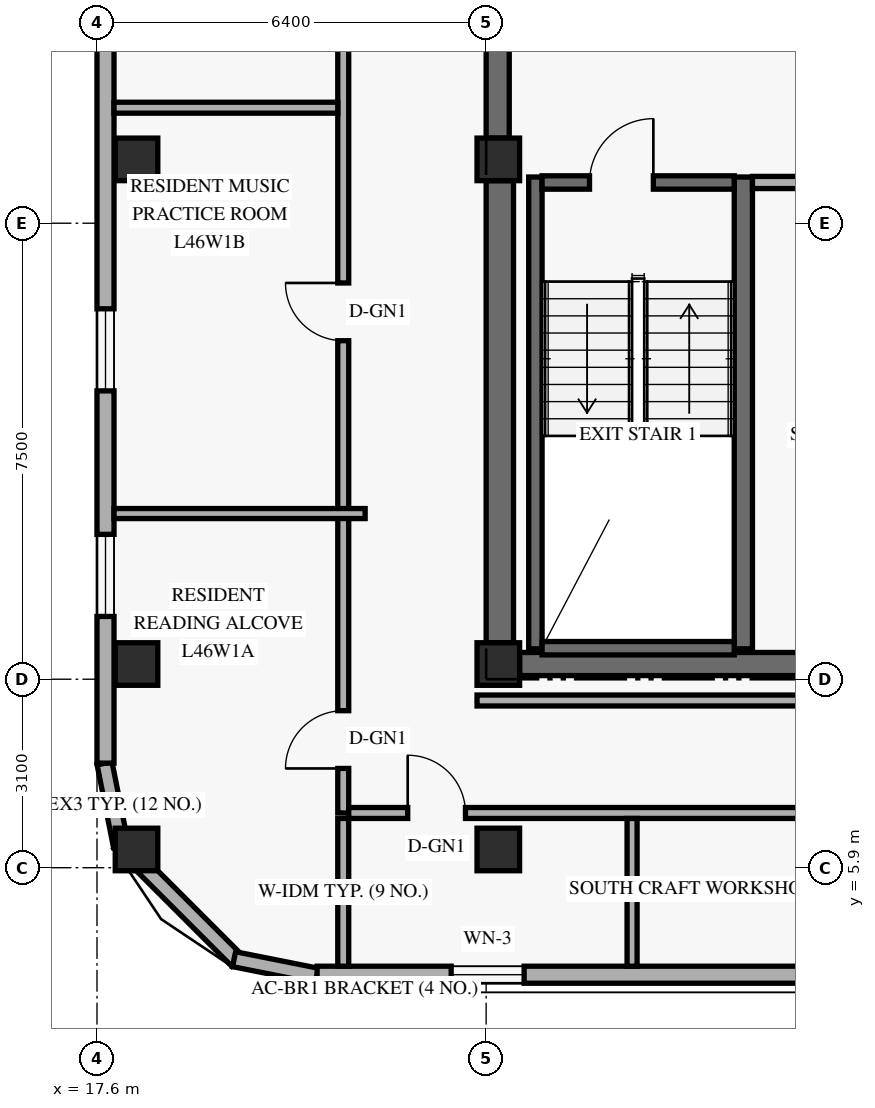
"""IFC4 building model, lengths in metres.
Left out: names, types, materials, properties, quantities, classifications, styles, units other than length and angle.
Written with IfcOpenShell. Run it as: python <this file> out.ifc"""

import sys

from ifc_helpers import new_model, si_unit, direction, frame, frame_2d, origin, origin_2d, place, context, subcontext, project, spatial, rectangle, extrude, element, fill, save


model = new_model("IFC4")
c1 = context("Model", 3, precision=1e-05, world=origin(), true_north=direction((0.0, 1.0)))
c2 = subcontext(c1, "Body", "Model", "MODEL_VIEW")
j1 = project(units=[si_unit("LENGTHUNIT", "METRE"), si_unit("PLANEANGLEUNIT", "RADIAN")], contexts=[c1])
p1 = place(None, origin())
s1 = spatial("IfcSite", under=j1, at=p1, CompositionType="ELEMENT")
p2 = place(p1, origin())
s2 = spatial("IfcBuilding", under=s1, at=p2, CompositionType="ELEMENT")
p3 = place(p2, frame((0.0, 0.0, 177.6)))
s3 = spatial("IfcBuildingStorey", under=s2, at=p3, CompositionType="ELEMENT", Elevation=177.6)
p4 = place(p3, frame((24.225, 9.6, 0.0), z_axis=(0.0, 0.0, 1.0), x_axis=(0.0, 1.0, 0.0)))
e1 = element("IfcWall", 1, at=p4, inside=s3, PredefinedType="SHEAR", context=c2, shape_type="SweptSolid", body=[
    extrude(rectangle(XDim=7.6, YDim=0.45, at=frame_2d((3.8, 0.0))), origin(), (0.0, 0.0, 1.0), 2.748),
])
p5 = place(p3, frame((24.19, 17.9, 0.0), z_axis=(0.0, 0.0, 1.0), x_axis=(0.0, 1.0, 0.0)))
e2 = element("IfcWall", 2, at=p5, inside=s3, PredefinedType="SHEAR", context=c2, shape_type="SweptSolid", body=[
    extrude(rectangle(XDim=11.95, YDim=0.38, at=frame_2d((5.975, 0.0))), origin(), (0.0, 0.0, 1.0), 2.748),
])
p6 = place(p3, frame((24.55, 9.25, 0.0), z_axis=(0.0, 0.0, 1.0), x_axis=(1.0, 0.0, 0.0)))
e3 = element("IfcWall", 3, at=p6, inside=s3, PredefinedType="SHEAR", context=c2, shape_type="SweptSolid", body=[
    extrude(rectangle(XDim=10.3, YDim=0.38, at=frame_2d((5.15, 0.0))), origin(), (0.0, 0.0, 1.0), 3.36),
])
p7 = place(p6, frame((5.2, 0.0, 0.0)))
e4 = element("IfcOpeningElement", 4, at=p7, cuts=e3, PredefinedType="OPENING", context=c2, shape_type="SweptSolid", body=[
    extrude(rectangle(XDim=1.05, YDim=2.15, at=frame_2d((0.525, 1.075))), frame((0.0, 0.2, 0.0), z_axis=(0.0, -1.0, 0.0), x_axis=(1.0, 0.0, 0.0)), (0.0, 0.0, 1.0), 0.4),
])
p8 = place(p3, frame((24.81, 9.5, 0.0), z_axis=(0.0, 0.0, 1.0), x_axis=(0.0, 1.0, 0.0)))
e5 = element("IfcWall", 5, at=p8, inside=s3, PredefinedType="SHEAR", context=c2, shape_type="SweptSolid", body=[
    extrude(rectangle(XDim=7.76, YDim=0.22, at=frame_2d((3.88, 0.0))), origin(), (0.0, 0.0, 1.0), 3.36),
])
p9 = place(p3, frame((28.23, 9.5, 0.0), z_axis=(0.0, 0.0, 1.0), x_axis=(0.0, 1.0, 0.0)))
e6 = element("IfcWall", 6, at=p9, inside=s3, PredefinedType="SHEAR", context=c2, shape_type="SweptSolid", body=[
    extrude(rectangle(XDim=7.76, YDim=0.3, at=frame_2d((3.88, 0.0))), origin(), (0.0, 0.0, 1.0), 3.36),
])
p10 = place(p3, frame((24.92, 9.51, 0.0), z_axis=(0.0, 0.0, 1.0), x_axis=(1.0, 0.0, 0.0)))
e7 = element("IfcWall", 7, at=p10, inside=s3, PredefinedType="SHEAR", context=c2, shape_type="SweptSolid", body=[
    extrude(rectangle(XDim=3.16, YDim=0.22, at=frame_2d((1.58, 0.0))), origin(), (0.0, 0.0, 1.0), 3.36),
])
p11 = place(p3, frame((24.92, 17.17, 0.0), z_axis=(0.0, 0.0, 1.0), x_axis=(1.0, 0.0, 0.0)))
e8 = element("IfcWall", 8, at=p11, inside=s3, PredefinedType="SHEAR", context=c2, shape_type="SweptSolid", body=[
    extrude(rectangle(XDim=3.16, YDim=0.22, at=frame_2d((1.58, 0.0))), origin(), (0.0, 0.0, 1.0), 3.36),
])
p12 = place(p11, frame((0.78, 0.0, 0.0)))
e9 = element("IfcOpeningElement", 9, at=p12, cuts=e8, PredefinedType="OPENING", context=c2, shape_type="SweptSolid", body=[
    extrude(rectangle(XDim=1.05, YDim=2.15, at=frame_2d((0.525, 1.075))), frame((0.0, 0.12, 0.0), z_axis=(0.0, -1.0, 0.0), x_axis=(1.0, 0.0, 0.0)), (0.0, 0.0, 1.0), 0.24),
])
for number, where, z_axis, x_axis in (
    (10, (18.25, 6.2, 0.0), (0.0, 0.0, 1.0), (1.0, 0.0, 0.0)),
    (11, (18.25, 9.25, 0.0), (0.0, 0.0, 1.0), (1.0, 0.0, 0.0)),
    (12, (18.25, 17.55, 0.0), (0.0, 0.0, 1.0), (1.0, 0.0, 0.0)),
    (13, (24.2, 6.2, 0.0), (0.0, 0.0, 1.0), (1.0, 0.0, 0.0)),
    (14, (24.2, 9.25, 0.0), (0.0, 0.0, 1.0), (1.0, 0.0, 0.0)),
    (15, (24.2, 17.55, 0.0), (0.0, 0.0, 1.0), (1.0, 0.0, 0.0)),
):
    element("IfcColumn", number, at=place(p3, frame(where, z_axis=z_axis, x_axis=x_axis)), inside=s3, PredefinedType="COLUMN", context=c2, shape_type="SweptSolid", body=[
        extrude(rectangle(XDim=0.7, YDim=0.7, at=origin_2d()), origin(), (0.0, 0.0, 1.0), 3.6),
    ])
p13 = place(p3, frame((17.724, 7.616, 0.0), z_axis=(0.0, 0.0, 1.0), x_axis=(0.195135625965, -0.9807762678, 0.0)))
e16 = element("IfcWall", 16, at=p13, inside=s3, PredefinedType="SOLIDWALL", context=c2, shape_type="SweptSolid", body=[
    extrude(rectangle(XDim=1.389, YDim=0.25, at=frame_2d((0.694, 0.0))), origin(), (0.0, 0.0, 1.0), 3.36),
])
p14 = place(p3, frame((17.968, 6.305, 0.0), z_axis=(0.0, 0.0, 1.0), x_axis=(0.707106781187, -0.707106781187, 0.0)))
e17 = element("IfcWall", 17, at=p14, inside=s3, PredefinedType="SOLIDWALL", context=c2, shape_type="SweptSolid", body=[
    extrude(rectangle(XDim=2.739, YDim=0.25, at=frame_2d((1.37, 0.0))), origin(), (0.0, 0.0, 1.0), 3.36),
])
p15 = place(p3, frame((19.854, 4.395, 0.0), z_axis=(0.0, 0.0, 1.0), x_axis=(0.980809899341, -0.19496651342, 0.0)))
e18 = element("IfcWall", 18, at=p15, inside=s3, PredefinedType="SOLIDWALL", context=c2, shape_type="SweptSolid", body=[
    extrude(rectangle(XDim=1.389, YDim=0.25, at=frame_2d((0.694, 0.0))), origin(), (0.0, 0.0, 1.0), 3.36),
])
p16 = place(p3, frame((21.22, 4.14, 0.0), z_axis=(0.0, 0.0, 1.0), x_axis=(1.0, 0.0, 0.0)))
e19 = element("IfcWall", 19, at=p16, inside=s3, PredefinedType="SOLIDWALL", context=c2, shape_type="SweptSolid", body=[
    extrude(rectangle(XDim=33.76, YDim=0.28, at=frame_2d((16.88, 0.0))), origin(), (0.0, 0.0, 1.0), 3.36),
])
p17 = place(p16, frame((2.205, 0.0, 0.85)))
e20 = element("IfcOpeningElement", 20, at=p17, cuts=e19, PredefinedType="OPENING", context=c2, shape_type="SweptSolid", body=[
    extrude(rectangle(XDim=1.2, YDim=1.5, at=frame_2d((0.6, 0.75))), frame((0.0, 0.15, 0.0), z_axis=(0.0, -1.0, 0.0), x_axis=(1.0, 0.0, 0.0)), (0.0, 0.0, 1.0), 0.3),
])
p18 = place(p16, frame((9.09, 0.0, 0.85)))
e21 = element("IfcOpeningElement", 21, at=p18, cuts=e19, PredefinedType="OPENING", context=c2, shape_type="SweptSolid", body=[
    extrude(rectangle(XDim=1.2, YDim=1.5, at=frame_2d((0.6, 0.75))), frame((0.0, 0.15, 0.0), z_axis=(0.0, -1.0, 0.0), x_axis=(1.0, 0.0, 0.0)), (0.0, 0.0, 1.0), 0.3),
])
p19 = place(p16, frame((14.665, 0.0, 0.85)))
e22 = element("IfcOpeningElement", 22, at=p19, cuts=e19, PredefinedType="OPENING", context=c2, shape_type="SweptSolid", body=[
    extrude(rectangle(XDim=1.2, YDim=1.5, at=frame_2d((0.6, 0.75))), frame((0.0, 0.15, 0.0), z_axis=(0.0, -1.0, 0.0), x_axis=(1.0, 0.0, 0.0)), (0.0, 0.0, 1.0), 0.3),
])
p20 = place(p16, frame((18.825, 0.0, 0.85)))
e23 = element("IfcOpeningElement", 23, at=p20, cuts=e19, PredefinedType="OPENING", context=c2, shape_type="SweptSolid", body=[
    extrude(rectangle(XDim=1.2, YDim=1.5, at=frame_2d((0.6, 0.75))), frame((0.0, 0.15, 0.0), z_axis=(0.0, -1.0, 0.0), x_axis=(1.0, 0.0, 0.0)), (0.0, 0.0, 1.0), 0.3),
])
p21 = place(p16, frame((23.95, 0.0, 0.85)))
e24 = element("IfcOpeningElement", 24, at=p21, cuts=e19, PredefinedType="OPENING", context=c2, shape_type="SweptSolid", body=[
    extrude(rectangle(XDim=1.2, YDim=1.5, at=frame_2d((0.6, 0.75))), frame((0.0, 0.15, 0.0), z_axis=(0.0, -1.0, 0.0), x_axis=(1.0, 0.0, 0.0)), (0.0, 0.0, 1.0), 0.3),
])
p22 = place(p16, frame((26.88, 0.0, 0.85)))
e25 = element("IfcOpeningElement", 25, at=p22, cuts=e19, PredefinedType="OPENING", context=c2, shape_type="SweptSolid", body=[
    extrude(rectangle(XDim=1.2, YDim=1.5, at=frame_2d((0.6, 0.75))), frame((0.0, 0.15, 0.0), z_axis=(0.0, -1.0, 0.0), x_axis=(1.0, 0.0, 0.0)), (0.0, 0.0, 1.0), 0.3),
])
p23 = place(p16, frame((30.47, 0.0, 0.85)))
e26 = element("IfcOpeningElement", 26, at=p23, cuts=e19, PredefinedType="OPENING", context=c2, shape_type="SweptSolid", body=[
    extrude(rectangle(XDim=1.2, YDim=1.5, at=frame_2d((0.6, 0.75))), frame((0.0, 0.15, 0.0), z_axis=(0.0, -1.0, 0.0), x_axis=(1.0, 0.0, 0.0)), (0.0, 0.0, 1.0), 0.3),
])
p24 = place(p3, frame((17.74, 40.38, 0.0), z_axis=(0.0, 0.0, 1.0), x_axis=(0.0, -1.0, 0.0)))
e27 = element("IfcWall", 27, at=p24, inside=s3, PredefinedType="SOLIDWALL", context=c2, shape_type="SweptSolid", body=[
    extrude(rectangle(XDim=32.76, YDim=0.28, at=frame_2d((16.38, 0.0))), origin(), (0.0, 0.0, 1.0), 3.36),
])
p25 = place(p24, frame((28.998, 0.0, 0.85)))
e28 = element("IfcOpeningElement", 28, at=p25, cuts=e27, PredefinedType="OPENING", context=c2, shape_type="SweptSolid", body=[
    extrude(rectangle(XDim=1.35, YDim=1.55, at=frame_2d((0.675, 0.775))), frame((0.0, 0.15, 0.0), z_axis=(0.0, -1.0, 0.0), x_axis=(1.0, 0.0, 0.0)), (0.0, 0.0, 1.0), 0.3),
])
p26 = place(p24, frame((25.288, 0.0, 0.85)))
e29 = element("IfcOpeningElement", 29, at=p26, cuts=e27, PredefinedType="OPENING", context=c2, shape_type="SweptSolid", body=[
    extrude(rectangle(XDim=1.35, YDim=1.55, at=frame_2d((0.675, 0.775))), frame((0.0, 0.15, 0.0), z_axis=(0.0, -1.0, 0.0), x_axis=(1.0, 0.0, 0.0)), (0.0, 0.0, 1.0), 0.3),
])
p27 = place(p24, frame((15.625, 0.0, 0.85)))
e30 = element("IfcOpeningElement", 30, at=p27, cuts=e27, PredefinedType="OPENING", context=c2, shape_type="SweptSolid", body=[
    extrude(rectangle(XDim=1.35, YDim=1.55, at=frame_2d((0.675, 0.775))), frame((0.0, 0.15, 0.0), z_axis=(0.0, -1.0, 0.0), x_axis=(1.0, 0.0, 0.0)), (0.0, 0.0, 1.0), 0.3),
])
p28 = place(p24, frame((5.212, 0.0, 0.85)))
e31 = element("IfcOpeningElement", 31, at=p28, cuts=e27, PredefinedType="OPENING", context=c2, shape_type="SweptSolid", body=[
    extrude(rectangle(XDim=1.35, YDim=1.55, at=frame_2d((0.675, 0.775))), frame((0.0, 0.15, 0.0), z_axis=(0.0, -1.0, 0.0), x_axis=(1.0, 0.0, 0.0)), (0.0, 0.0, 1.0), 0.3),
])
p29 = place(p3, frame((28.38, 17.17, 0.0), z_axis=(0.0, 0.0, 1.0), x_axis=(1.0, 0.0, 0.0)))
e32 = element("IfcWall", 32, at=p29, inside=s3, PredefinedType="STANDARD", context=c2, shape_type="SweptSolid", body=[
    extrude(rectangle(XDim=2.9, YDim=0.2, at=frame_2d((1.45, 0.0))), origin(), (0.0, 0.0, 1.0), 3.36),
])
p30 = place(p3, frame((21.65, 6.8, 0.0), z_axis=(0.0, 0.0, 1.0), x_axis=(0.0, 1.0, 0.0)))
e33 = element("IfcWall", 33, at=p30, inside=s3, PredefinedType="STANDARD", context=c2, shape_type="SweptSolid", body=[
    extrude(rectangle(XDim=34.4, YDim=0.18, at=frame_2d((17.2, 0.0))), origin(), (0.0, 0.0, 1.0), 2.73),
])
p31 = place(p30, frame((0.732, 0.0, 0.0)))
e34 = element("IfcOpeningElement", 34, at=p31, cuts=e33, PredefinedType="OPENING", context=c2, shape_type="SweptSolid", body=[
    extrude(rectangle(XDim=0.95, YDim=2.15, at=frame_2d((0.475, 1.075))), frame((0.0, 0.1, 0.0), z_axis=(0.0, -1.0, 0.0), x_axis=(1.0, 0.0, 0.0)), (0.0, 0.0, 1.0), 0.2),
])
p32 = place(p30, frame((7.768, 0.0, 0.0)))
e35 = element("IfcOpeningElement", 35, at=p32, cuts=e33, PredefinedType="OPENING", context=c2, shape_type="SweptSolid", body=[
    extrude(rectangle(XDim=0.95, YDim=2.15, at=frame_2d((0.475, 1.075))), frame((0.0, 0.1, 0.0), z_axis=(0.0, -1.0, 0.0), x_axis=(1.0, 0.0, 0.0)), (0.0, 0.0, 1.0), 0.2),
])
p33 = place(p30, frame((17.333, 0.0, 0.0)))
e36 = element("IfcOpeningElement", 36, at=p33, cuts=e33, PredefinedType="OPENING", context=c2, shape_type="SweptSolid", body=[
    extrude(rectangle(XDim=0.95, YDim=2.15, at=frame_2d((0.475, 1.075))), frame((0.0, 0.1, 0.0), z_axis=(0.0, -1.0, 0.0), x_axis=(1.0, 0.0, 0.0)), (0.0, 0.0, 1.0), 0.2),
])
p34 = place(p30, frame((29.968, 0.0, 0.0)))
e37 = element("IfcOpeningElement", 37, at=p34, cuts=e33, PredefinedType="OPENING", context=c2, shape_type="SweptSolid", body=[
    extrude(rectangle(XDim=0.95, YDim=2.15, at=frame_2d((0.475, 1.075))), frame((0.0, 0.1, 0.0), z_axis=(0.0, -1.0, 0.0), x_axis=(1.0, 0.0, 0.0)), (0.0, 0.0, 1.0), 0.2),
])
p35 = place(p3, frame((21.74, 6.8, 0.0), z_axis=(0.0, 0.0, 1.0), x_axis=(1.0, 0.0, 0.0)))
e38 = element("IfcWall", 38, at=p35, inside=s3, PredefinedType="STANDARD", context=c2, shape_type="SweptSolid", body=[
    extrude(rectangle(XDim=13.68, YDim=0.18, at=frame_2d((6.84, 0.0))), origin(), (0.0, 0.0, 1.0), 2.73),
])
p36 = place(p35, frame((0.97, 0.0, 0.0)))
e39 = element("IfcOpeningElement", 39, at=p36, cuts=e38, PredefinedType="OPENING", context=c2, shape_type="SweptSolid", body=[
    extrude(rectangle(XDim=0.95, YDim=2.15, at=frame_2d((0.475, 1.075))), frame((0.0, 0.1, 0.0), z_axis=(0.0, -1.0, 0.0), x_axis=(1.0, 0.0, 0.0)), (0.0, 0.0, 1.0), 0.2),
])
p37 = place(p35, frame((9.11, 0.0, 0.0)))
e40 = element("IfcOpeningElement", 40, at=p37, cuts=e38, PredefinedType="OPENING", context=c2, shape_type="SweptSolid", body=[
    extrude(rectangle(XDim=0.95, YDim=2.15, at=frame_2d((0.475, 1.075))), frame((0.0, 0.1, 0.0), z_axis=(0.0, -1.0, 0.0), x_axis=(1.0, 0.0, 0.0)), (0.0, 0.0, 1.0), 0.2),
])
p38 = place(p3, frame((23.85, 8.65, 0.0), z_axis=(0.0, 0.0, 1.0), x_axis=(1.0, 0.0, 0.0)))
e41 = element("IfcWall", 41, at=p38, inside=s3, PredefinedType="STANDARD", context=c2, shape_type="SweptSolid", body=[
    extrude(rectangle(XDim=11.57, YDim=0.18, at=frame_2d((5.785, 0.0))), origin(), (0.0, 0.0, 1.0), 2.73),
])
p39 = place(p3, frame((21.65, 4.28, 0.0), z_axis=(0.0, 0.0, 1.0), x_axis=(0.0, 1.0, 0.0)))
e42 = element("IfcWall", 42, at=p39, inside=s3, PredefinedType="PARTITIONING", context=c2, shape_type="SweptSolid", body=[
    extrude(rectangle(XDim=2.43, YDim=0.18, at=frame_2d((1.215, 0.0))), origin(), (0.0, 0.0, 1.0), 2.879),
])
p40 = place(p3, frame((17.88, 11.725, 0.0), z_axis=(0.0, 0.0, 1.0), x_axis=(1.0, 0.0, 0.0)))
e43 = element("IfcWall", 43, at=p40, inside=s3, PredefinedType="PARTITIONING", context=c2, shape_type="SweptSolid", body=[
    extrude(rectangle(XDim=4.13, YDim=0.165, at=frame_2d((2.065, 0.0))), origin(), (0.0, 0.0, 1.0), 2.879),
])
p41 = place(p3, frame((17.88, 18.4, 0.0), z_axis=(0.0, 0.0, 1.0), x_axis=(1.0, 0.0, 0.0)))
e44 = element("IfcWall", 44, at=p41, inside=s3, PredefinedType="PARTITIONING", context=c2, shape_type="SweptSolid", body=[
    extrude(rectangle(XDim=3.68, YDim=0.18, at=frame_2d((1.84, 0.0))), origin(), (0.0, 0.0, 1.0), 2.879),
])
p42 = place(p3, frame((26.4, 4.28, 0.0), z_axis=(0.0, 0.0, 1.0), x_axis=(0.0, 1.0, 0.0)))
e45 = element("IfcWall", 45, at=p42, inside=s3, PredefinedType="PARTITIONING", context=c2, shape_type="SweptSolid", body=[
    extrude(rectangle(XDim=2.43, YDim=0.165, at=frame_2d((1.215, 0.0))), origin(), (0.0, 0.0, 1.0), 2.879),
])
p43 = place(p17, origin())
e46 = element("IfcWindow", 46, at=p43, inside=s3, PartitioningType="SINGLE_PANEL", PredefinedType="WINDOW", context=c2, shape_type="SweptSolid", body=[
    extrude(rectangle(XDim=1.2, YDim=1.5, at=frame_2d((0.6, 0.75))), frame((0.0, 0.03, 0.0), z_axis=(0.0, -1.0, 0.0), x_axis=(1.0, 0.0, 0.0)), (0.0, 0.0, 1.0), 0.06),
])
fill(e20, e46)
p44 = place(p25, origin())
e47 = element("IfcWindow", 47, at=p44, inside=s3, PartitioningType="SINGLE_PANEL", PredefinedType="WINDOW", context=c2, shape_type="SweptSolid", body=[
    extrude(rectangle(XDim=1.35, YDim=1.55, at=frame_2d((0.675, 0.775))), frame((0.0, 0.03, 0.0), z_axis=(0.0, -1.0, 0.0), x_axis=(1.0, 0.0, 0.0)), (0.0, 0.0, 1.0), 0.06),
])
fill(e28, e47)
p45 = place(p26, origin())
e48 = element("IfcWindow", 48, at=p45, inside=s3, PartitioningType="SINGLE_PANEL", PredefinedType="WINDOW", context=c2, shape_type="SweptSolid", body=[
    extrude(rectangle(XDim=1.35, YDim=1.55, at=frame_2d((0.675, 0.775))), frame((0.0, 0.03, 0.0), z_axis=(0.0, -1.0, 0.0), x_axis=(1.0, 0.0, 0.0)), (0.0, 0.0, 1.0), 0.06),
])
fill(e29, e48)
p46 = place(p12, frame((1.05, 0.0, 0.0), z_axis=(0.0, 0.0, 1.0), x_axis=(-1.0, 0.0, 0.0)))
e49 = element("IfcDoor", 49, at=p46, inside=s3, OperationType="SINGLE_SWING_LEFT", PredefinedType="DOOR", context=c2, shape_type="SweptSolid", body=[
    extrude(rectangle(XDim=1.05, YDim=2.15, at=frame_2d((0.525, 1.075))), frame((0.0, 0.025, 0.0), z_axis=(0.0, -1.0, 0.0), x_axis=(1.0, 0.0, 0.0)), (0.0, 0.0, 1.0), 0.05),
])
fill(e9, e49)
p47 = place(p31, origin())
e50 = element("IfcDoor", 50, at=p47, inside=s3, OperationType="SINGLE_SWING_LEFT", PredefinedType="DOOR", context=c2, shape_type="SweptSolid", body=[
    extrude(rectangle(XDim=0.95, YDim=2.15, at=frame_2d((0.475, 1.075))), frame((0.0, 0.025, 0.0), z_axis=(0.0, -1.0, 0.0), x_axis=(1.0, 0.0, 0.0)), (0.0, 0.0, 1.0), 0.05),
])
fill(e34, e50)
p48 = place(p32, origin())
e51 = element("IfcDoor", 51, at=p48, inside=s3, OperationType="SINGLE_SWING_RIGHT", PredefinedType="DOOR", context=c2, shape_type="SweptSolid", body=[
    extrude(rectangle(XDim=0.95, YDim=2.15, at=frame_2d((0.475, 1.075))), frame((0.0, 0.025, 0.0), z_axis=(0.0, -1.0, 0.0), x_axis=(1.0, 0.0, 0.0)), (0.0, 0.0, 1.0), 0.05),
])
fill(e35, e51)
p49 = place(p36, origin())
e52 = element("IfcDoor", 52, at=p49, inside=s3, OperationType="SINGLE_SWING_LEFT", PredefinedType="DOOR", context=c2, shape_type="SweptSolid", body=[
    extrude(rectangle(XDim=0.95, YDim=2.15, at=frame_2d((0.475, 1.075))), frame((0.0, 0.025, 0.0), z_axis=(0.0, -1.0, 0.0), x_axis=(1.0, 0.0, 0.0)), (0.0, 0.0, 1.0), 0.05),
])
fill(e39, e52)
save(model, sys.argv[1])
